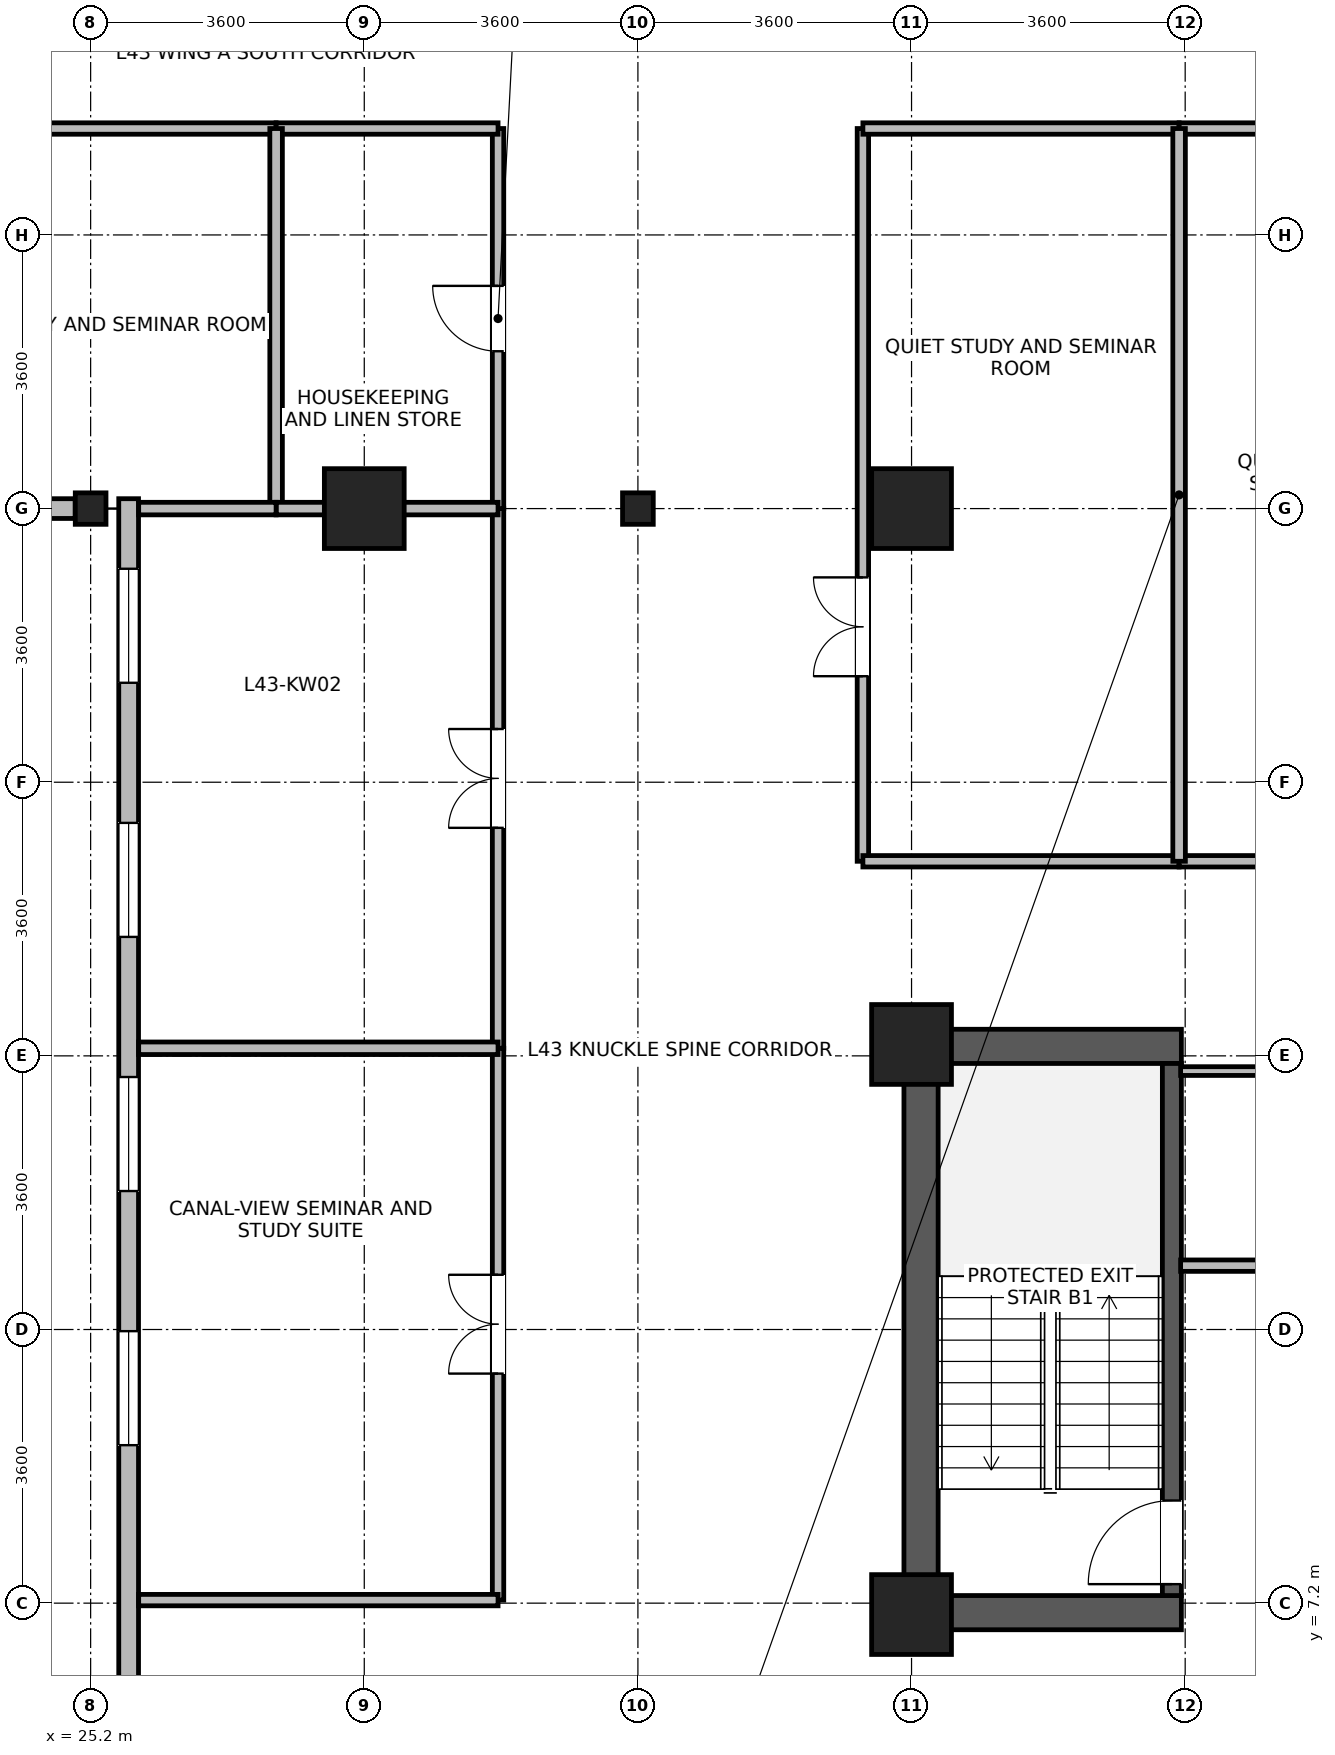
"""IFC4 building model, lengths in metres.
Left out: names, types, materials, properties, quantities, classifications, styles, units other than length and angle.
Written with IfcOpenShell. Run it as: python <this file> out.ifc"""

import sys

from ifc_helpers import new_model, si_unit, direction, frame, frame_2d, origin, origin_2d, place, context, subcontext, project, spatial, rectangle, i_section, extrude, source, transform, mapped, element, fill, save


model = new_model("IFC4")
c1 = context("Model", 3, precision=1e-05, world=origin(), true_north=direction((0.0, 1.0)))
c2 = subcontext(c1, "Body", "Model", "MODEL_VIEW")
j1 = project(units=[si_unit("LENGTHUNIT", "METRE"), si_unit("PLANEANGLEUNIT", "RADIAN")], contexts=[c1])
p1 = place(None, origin())
s1 = spatial("IfcSite", under=j1, at=p1, CompositionType="ELEMENT")
p2 = place(p1, origin())
s2 = spatial("IfcBuilding", under=s1, at=p2, CompositionType="ELEMENT")
p3 = place(p2, frame((0.0, 0.0, 169.8)))
s3 = spatial("IfcBuildingStorey", under=s2, at=p3, CompositionType="ELEMENT", Elevation=169.8)
p4 = place(p3, frame((36.125, 6.85, 0.0), z_axis=(0.0, 0.0, 1.0), x_axis=(0.0, 1.0, 0.0)))
e1 = element("IfcWall", 1, at=p4, inside=s3, PredefinedType="SHEAR", context=c2, shape_type="SweptSolid", body=[
    extrude(rectangle(XDim=7.9, YDim=0.45, at=frame_2d((3.95, 0.0))), origin(), (0.0, 0.0, 1.0), 3.46),
])
for number, where, z_axis, x_axis in (
    (2, (36.35, 7.075, 0.0), (0.0, 0.0, 1.0), (1.0, 0.0, 0.0)),
    (3, (36.35, 14.525, 0.0), (0.0, 0.0, 1.0), (1.0, 0.0, 0.0)),
):
    element("IfcWall", number, at=place(p3, frame(where, z_axis=z_axis, x_axis=x_axis)), inside=s3, PredefinedType="SHEAR", context=c2, shape_type="SweptSolid", body=[
        extrude(rectangle(XDim=3.2, YDim=0.45, at=frame_2d((1.6, 0.0))), origin(), (0.0, 0.0, 1.0), 3.46),
    ])
p5 = place(p3, frame((39.425, 7.3, 0.0), z_axis=(0.0, 0.0, 1.0), x_axis=(0.0, 1.0, 0.0)))
e4 = element("IfcWall", 4, at=p5, inside=s3, PredefinedType="SHEAR", context=c2, shape_type="SweptSolid", body=[
    extrude(rectangle(XDim=7.0, YDim=0.25, at=frame_2d((3.5, 0.0))), origin(), (0.0, 0.0, 1.0), 3.46),
])
p6 = place(p5, frame((0.15, 0.0, 0.0)))
e5 = element("IfcOpeningElement", 5, at=p6, cuts=e4, PredefinedType="OPENING", context=c2, shape_type="SweptSolid", body=[
    extrude(rectangle(XDim=1.1, YDim=2.08, at=frame_2d((0.55, 1.04))), frame((0.0, 0.135, 0.0), z_axis=(0.0, -1.0, 0.0), x_axis=(1.0, 0.0, 0.0)), (0.0, 0.0, 1.0), 0.27),
])
m1 = source(origin(), c2, "Body", "SweptSolid", [
    extrude(rectangle(XDim=1.05, YDim=1.05, at=origin_2d()), origin(), (0.0, 0.0, 1.0), 3.7),
])
for number, where, z_axis, x_axis in (
    (6, (28.8, 21.6, 0.0), (0.0, 0.0, 1.0), (1.0, 0.0, 0.0)),
    (7, (36.0, 21.6, 0.0), (0.0, 0.0, 1.0), (1.0, 0.0, 0.0)),
    (8, (36.0, 7.05, 0.0), (0.0, 0.0, 1.0), (1.0, 0.0, 0.0)),
    (9, (36.0, 14.55, 0.0), (0.0, 0.0, 1.0), (1.0, 0.0, 0.0)),
):
    element("IfcColumn", number, at=place(p3, frame(where, z_axis=z_axis, x_axis=x_axis)), inside=s3, PredefinedType="COLUMN", context=c2, shape_type="MappedRepresentation", body=[
        mapped(m1, transform((0.0, 0.0, 0.0), x_axis=(1.0, 0.0, 0.0), y_axis=(0.0, 1.0, 0.0), z_axis=(0.0, 0.0, 1.0), scale=1.0)),
    ])
m2 = source(origin(), c2, "Body", "SweptSolid", [
    extrude(i_section(OverallWidth=0.404, OverallDepth=0.414, WebThickness=0.021, FlangeThickness=0.028, FilletRadius=0.015, at=origin_2d()), origin(), (0.0, 0.0, 1.0), 3.7),
])
for number, where, z_axis, x_axis in (
    (10, (25.2, 21.6, 0.0), (0.0, 0.0, 1.0), (1.0, 0.0, 0.0)),
    (11, (32.4, 21.6, 0.0), (0.0, 0.0, 1.0), (1.0, 0.0, 0.0)),
):
    element("IfcColumn", number, at=place(p3, frame(where, z_axis=z_axis, x_axis=x_axis)), inside=s3, PredefinedType="COLUMN", context=c2, shape_type="MappedRepresentation", body=[
        mapped(m2, transform((0.0, 0.0, 0.0), x_axis=(1.0, 0.0, 0.0), y_axis=(0.0, 1.0, 0.0), z_axis=(0.0, 0.0, 1.0), scale=1.0)),
    ])
p7 = place(p3, frame((24.997, 21.6, 0.0), z_axis=(0.0, 0.0, 1.0), x_axis=(-1.0, 0.0, 0.0)))
e12 = element("IfcWall", 12, at=p7, inside=s3, PredefinedType="STANDARD", context=c2, shape_type="SweptSolid", body=[
    extrude(rectangle(XDim=2.871, YDim=0.26, at=frame_2d((1.436, 0.0))), origin(), (0.0, 0.0, 1.0), 2.99),
])
p8 = place(p7, frame((0.96, 0.0, 0.85)))
e13 = element("IfcOpeningElement", 13, at=p8, cuts=e12, PredefinedType="OPENING", context=c2, shape_type="SweptSolid", body=[
    extrude(rectangle(XDim=0.95, YDim=1.75, at=frame_2d((0.475, 0.875))), frame((0.0, 0.14, 0.0), z_axis=(0.0, -1.0, 0.0), x_axis=(1.0, 0.0, 0.0)), (0.0, 0.0, 1.0), 0.28),
])
p9 = place(p3, frame((25.7, 1.67, 0.0), z_axis=(0.0, 0.0, 1.0), x_axis=(0.0, 1.0, 0.0)))
e14 = element("IfcWall", 14, at=p9, inside=s3, PredefinedType="STANDARD", context=c2, shape_type="SweptSolid", body=[
    extrude(rectangle(XDim=20.06, YDim=0.26, at=frame_2d((10.03, 0.0))), origin(), (0.0, 0.0, 1.0), 3.44),
])
p10 = place(p9, frame((0.922, 0.0, 0.85)))
e15 = element("IfcOpeningElement", 15, at=p10, cuts=e14, PredefinedType="OPENING", context=c2, shape_type="SweptSolid", body=[
    extrude(rectangle(XDim=1.5, YDim=1.85, at=frame_2d((0.75, 0.925))), frame((0.0, 0.14, 0.0), z_axis=(0.0, -1.0, 0.0), x_axis=(1.0, 0.0, 0.0)), (0.0, 0.0, 1.0), 0.28),
])
p11 = place(p9, frame((7.608, 0.0, 0.85)))
e16 = element("IfcOpeningElement", 16, at=p11, cuts=e14, PredefinedType="OPENING", context=c2, shape_type="SweptSolid", body=[
    extrude(rectangle(XDim=1.5, YDim=1.85, at=frame_2d((0.75, 0.925))), frame((0.0, 0.14, 0.0), z_axis=(0.0, -1.0, 0.0), x_axis=(1.0, 0.0, 0.0)), (0.0, 0.0, 1.0), 0.28),
])
p12 = place(p9, frame((10.952, 0.0, 0.85)))
e17 = element("IfcOpeningElement", 17, at=p12, cuts=e14, PredefinedType="OPENING", context=c2, shape_type="SweptSolid", body=[
    extrude(rectangle(XDim=1.5, YDim=1.85, at=frame_2d((0.75, 0.925))), frame((0.0, 0.14, 0.0), z_axis=(0.0, -1.0, 0.0), x_axis=(1.0, 0.0, 0.0)), (0.0, 0.0, 1.0), 0.28),
])
p13 = place(p9, frame((14.295, 0.0, 0.85)))
e18 = element("IfcOpeningElement", 18, at=p13, cuts=e14, PredefinedType="OPENING", context=c2, shape_type="SweptSolid", body=[
    extrude(rectangle(XDim=1.5, YDim=1.85, at=frame_2d((0.75, 0.925))), frame((0.0, 0.14, 0.0), z_axis=(0.0, -1.0, 0.0), x_axis=(1.0, 0.0, 0.0)), (0.0, 0.0, 1.0), 0.28),
])
p14 = place(p9, frame((17.638, 0.0, 0.85)))
e19 = element("IfcOpeningElement", 19, at=p14, cuts=e14, PredefinedType="OPENING", context=c2, shape_type="SweptSolid", body=[
    extrude(rectangle(XDim=1.5, YDim=1.85, at=frame_2d((0.75, 0.925))), frame((0.0, 0.14, 0.0), z_axis=(0.0, -1.0, 0.0), x_axis=(1.0, 0.0, 0.0)), (0.0, 0.0, 1.0), 0.28),
])
p15 = place(p3, frame((35.36, 16.96, 0.0), z_axis=(0.0, 0.0, 1.0), x_axis=(0.0, 1.0, 0.0)))
e20 = element("IfcWall", 20, at=p15, inside=s3, PredefinedType="PARTITIONING", context=c2, shape_type="SweptSolid", body=[
    extrude(rectangle(XDim=9.64, YDim=0.15, at=frame_2d((4.82, 0.0))), origin(), (0.0, 0.0, 1.0), 3.44),
])
p16 = place(p15, frame((2.435, 0.0, 0.0)))
e21 = element("IfcOpeningElement", 21, at=p16, cuts=e20, PredefinedType="OPENING", context=c2, shape_type="SweptSolid", body=[
    extrude(rectangle(XDim=1.3, YDim=2.12, at=frame_2d((0.65, 1.06))), frame((0.0, 0.085, 0.0), z_axis=(0.0, -1.0, 0.0), x_axis=(1.0, 0.0, 0.0)), (0.0, 0.0, 1.0), 0.17),
])
p17 = place(p3, frame((19.4, 26.6, 0.0), z_axis=(0.0, 0.0, 1.0), x_axis=(1.0, 0.0, 0.0)))
e22 = element("IfcWall", 22, at=p17, inside=s3, PredefinedType="PARTITIONING", context=c2, shape_type="SweptSolid", body=[
    extrude(rectangle(XDim=8.24, YDim=0.15, at=frame_2d((4.12, 0.0))), origin(), (0.0, 0.0, 1.0), 3.44),
])
p18 = place(p17, frame((3.47, 0.0, 0.0)))
e23 = element("IfcOpeningElement", 23, at=p18, cuts=e22, PredefinedType="OPENING", context=c2, shape_type="SweptSolid", body=[
    extrude(rectangle(XDim=1.3, YDim=2.12, at=frame_2d((0.65, 1.06))), frame((0.0, 0.085, 0.0), z_axis=(0.0, -1.0, 0.0), x_axis=(1.0, 0.0, 0.0)), (0.0, 0.0, 1.0), 0.17),
])
p19 = place(p3, frame((30.56, 7.24, 0.0), z_axis=(0.0, 0.0, 1.0), x_axis=(0.0, 1.0, 0.0)))
e24 = element("IfcWall", 24, at=p19, inside=s3, PredefinedType="PARTITIONING", context=c2, shape_type="SweptSolid", body=[
    extrude(rectangle(XDim=7.26, YDim=0.15, at=frame_2d((3.63, 0.0))), origin(), (0.0, 0.0, 1.0), 3.44),
])
p20 = place(p19, frame((2.98, 0.0, 0.0)))
e25 = element("IfcOpeningElement", 25, at=p20, cuts=e24, PredefinedType="OPENING", context=c2, shape_type="SweptSolid", body=[
    extrude(rectangle(XDim=1.3, YDim=2.12, at=frame_2d((0.65, 1.06))), frame((0.0, 0.085, 0.0), z_axis=(0.0, -1.0, 0.0), x_axis=(1.0, 0.0, 0.0)), (0.0, 0.0, 1.0), 0.17),
])
p21 = place(p3, frame((30.56, 14.5, 0.0), z_axis=(0.0, 0.0, 1.0), x_axis=(0.0, 1.0, 0.0)))
e26 = element("IfcWall", 26, at=p21, inside=s3, PredefinedType="PARTITIONING", context=c2, shape_type="SweptSolid", body=[
    extrude(rectangle(XDim=7.1, YDim=0.15, at=frame_2d((3.55, 0.0))), origin(), (0.0, 0.0, 1.0), 3.44),
])
p22 = place(p21, frame((2.9, 0.0, 0.0)))
e27 = element("IfcOpeningElement", 27, at=p22, cuts=e26, PredefinedType="OPENING", context=c2, shape_type="SweptSolid", body=[
    extrude(rectangle(XDim=1.3, YDim=2.12, at=frame_2d((0.65, 1.06))), frame((0.0, 0.085, 0.0), z_axis=(0.0, -1.0, 0.0), x_axis=(1.0, 0.0, 0.0)), (0.0, 0.0, 1.0), 0.17),
])
p23 = place(p3, frame((30.56, 21.6, 0.0), z_axis=(0.0, 0.0, 1.0), x_axis=(0.0, 1.0, 0.0)))
e28 = element("IfcWall", 28, at=p23, inside=s3, PredefinedType="PARTITIONING", context=c2, shape_type="SweptSolid", body=[
    extrude(rectangle(XDim=5.0, YDim=0.15, at=frame_2d((2.5, 0.0))), origin(), (0.0, 0.0, 1.0), 3.44),
])
p24 = place(p23, frame((2.07, 0.0, 0.0)))
e29 = element("IfcOpeningElement", 29, at=p24, cuts=e28, PredefinedType="OPENING", context=c2, shape_type="SweptSolid", body=[
    extrude(rectangle(XDim=0.86, YDim=2.02, at=frame_2d((0.43, 1.01))), frame((0.0, 0.085, 0.0), z_axis=(0.0, -1.0, 0.0), x_axis=(1.0, 0.0, 0.0)), (0.0, 0.0, 1.0), 0.17),
])
p25 = place(p3, frame((25.832, 7.24, 0.0), z_axis=(0.0, 0.0, 1.0), x_axis=(1.0, 0.0, 0.0)))
e30 = element("IfcWall", 30, at=p25, inside=s3, PredefinedType="PARTITIONING", context=c2, shape_type="SweptSolid", body=[
    extrude(rectangle(XDim=4.728, YDim=0.15, at=frame_2d((2.364, 0.0))), origin(), (0.0, 0.0, 1.0), 3.44),
])
for number, where, z_axis, x_axis in (
    (31, (35.36, 16.96, 0.0), (0.0, 0.0, 1.0), (1.0, 0.0, 0.0)),
    (32, (35.36, 26.6, 0.0), (0.0, 0.0, 1.0), (1.0, 0.0, 0.0)),
):
    element("IfcWall", number, at=place(p3, frame(where, z_axis=z_axis, x_axis=x_axis)), inside=s3, PredefinedType="PARTITIONING", context=c2, shape_type="SweptSolid", body=[
        extrude(rectangle(XDim=4.16, YDim=0.15, at=frame_2d((2.08, 0.0))), origin(), (0.0, 0.0, 1.0), 3.44),
    ])
p26 = place(p3, frame((39.54, 11.64, 0.0), z_axis=(0.0, 0.0, 1.0), x_axis=(1.0, 0.0, 0.0)))
e33 = element("IfcWall", 33, at=p26, inside=s3, PredefinedType="PARTITIONING", context=c2, shape_type="SweptSolid", body=[
    extrude(rectangle(XDim=4.06, YDim=0.15, at=frame_2d((2.03, 0.0))), origin(), (0.0, 0.0, 1.0), 3.44),
])
p27 = place(p26, frame((1.58, 0.0, 0.0)))
e34 = element("IfcOpeningElement", 34, at=p27, cuts=e33, PredefinedType="OPENING", context=c2, shape_type="SweptSolid", body=[
    extrude(rectangle(XDim=0.9, YDim=2.08, at=frame_2d((0.45, 1.04))), frame((0.0, 0.085, 0.0), z_axis=(0.0, -1.0, 0.0), x_axis=(1.0, 0.0, 0.0)), (0.0, 0.0, 1.0), 0.17),
])
p28 = place(p3, frame((39.52, 16.96, 0.0), z_axis=(0.0, 0.0, 1.0), x_axis=(1.0, 0.0, 0.0)))
e35 = element("IfcWall", 35, at=p28, inside=s3, PredefinedType="PARTITIONING", context=c2, shape_type="SweptSolid", body=[
    extrude(rectangle(XDim=3.86, YDim=0.15, at=frame_2d((1.93, 0.0))), origin(), (0.0, 0.0, 1.0), 3.44),
])
p29 = place(p28, frame((1.28, 0.0, 0.0)))
e36 = element("IfcOpeningElement", 36, at=p29, cuts=e35, PredefinedType="OPENING", context=c2, shape_type="SweptSolid", body=[
    extrude(rectangle(XDim=1.3, YDim=2.12, at=frame_2d((0.65, 1.06))), frame((0.0, 0.085, 0.0), z_axis=(0.0, -1.0, 0.0), x_axis=(1.0, 0.0, 0.0)), (0.0, 0.0, 1.0), 0.17),
])
p30 = place(p3, frame((39.52, 26.6, 0.0), z_axis=(0.0, 0.0, 1.0), x_axis=(1.0, 0.0, 0.0)))
e37 = element("IfcWall", 37, at=p30, inside=s3, PredefinedType="PARTITIONING", context=c2, shape_type="SweptSolid", body=[
    extrude(rectangle(XDim=3.86, YDim=0.15, at=frame_2d((1.93, 0.0))), origin(), (0.0, 0.0, 1.0), 3.44),
])
p31 = place(p3, frame((27.64, 26.6, 0.0), z_axis=(0.0, 0.0, 1.0), x_axis=(1.0, 0.0, 0.0)))
e38 = element("IfcWall", 38, at=p31, inside=s3, PredefinedType="PARTITIONING", context=c2, shape_type="SweptSolid", body=[
    extrude(rectangle(XDim=2.92, YDim=0.15, at=frame_2d((1.46, 0.0))), origin(), (0.0, 0.0, 1.0), 3.44),
])
p32 = place(p3, frame((39.52, 16.96, 0.0), z_axis=(0.0, 0.0, 1.0), x_axis=(0.0, 1.0, 0.0)))
e39 = element("IfcWall", 39, at=p32, inside=s3, PredefinedType="PARTITIONING", context=c2, shape_type="SweptSolid", body=[
    extrude(rectangle(XDim=9.64, YDim=0.165, at=frame_2d((4.82, 0.0))), origin(), (0.0, 0.0, 1.0), 3.44),
])
p33 = place(p3, frame((27.64, 21.6, 0.0), z_axis=(0.0, 0.0, 1.0), x_axis=(0.0, 1.0, 0.0)))
e40 = element("IfcWall", 40, at=p33, inside=s3, PredefinedType="PARTITIONING", context=c2, shape_type="SweptSolid", body=[
    extrude(rectangle(XDim=5.0, YDim=0.165, at=frame_2d((2.5, 0.0))), origin(), (0.0, 0.0, 1.0), 3.44),
])
p34 = place(p3, frame((25.832, 14.5, 0.0), z_axis=(0.0, 0.0, 1.0), x_axis=(1.0, 0.0, 0.0)))
e41 = element("IfcWall", 41, at=p34, inside=s3, PredefinedType="PARTITIONING", context=c2, shape_type="SweptSolid", body=[
    extrude(rectangle(XDim=4.728, YDim=0.165, at=frame_2d((2.364, 0.0))), origin(), (0.0, 0.0, 1.0), 3.44),
])
p35 = place(p3, frame((39.54, 14.2, 0.0), z_axis=(0.0, 0.0, 1.0), x_axis=(1.0, 0.0, 0.0)))
e42 = element("IfcWall", 42, at=p35, inside=s3, PredefinedType="PARTITIONING", context=c2, shape_type="SweptSolid", body=[
    extrude(rectangle(XDim=3.135, YDim=0.115, at=frame_2d((1.567, 0.0))), origin(), (0.0, 0.0, 1.0), 2.44),
])
p36 = place(p3, frame((27.64, 21.6, 0.0), z_axis=(0.0, 0.0, 1.0), x_axis=(1.0, 0.0, 0.0)))
e43 = element("IfcWall", 43, at=p36, inside=s3, PredefinedType="PARTITIONING", context=c2, shape_type="SweptSolid", body=[
    extrude(rectangle(XDim=2.92, YDim=0.165, at=frame_2d((1.46, 0.0))), origin(), (0.0, 0.0, 1.0), 2.99),
])
p37 = place(p3, frame((25.832, 21.6, 0.0), z_axis=(0.0, 0.0, 1.0), x_axis=(1.0, 0.0, 0.0)))
e44 = element("IfcWall", 44, at=p37, inside=s3, PredefinedType="PARTITIONING", context=c2, shape_type="SweptSolid", body=[
    extrude(rectangle(XDim=1.808, YDim=0.165, at=frame_2d((0.904, 0.0))), origin(), (0.0, 0.0, 1.0), 2.99),
])
p38 = place(p11, origin())
e45 = element("IfcWindow", 45, at=p38, inside=s3, PartitioningType="SINGLE_PANEL", PredefinedType="WINDOW", context=c2, shape_type="SweptSolid", body=[
    extrude(rectangle(XDim=1.5, YDim=1.85, at=frame_2d((0.75, 0.925))), frame((0.0, 0.03, 0.0), z_axis=(0.0, -1.0, 0.0), x_axis=(1.0, 0.0, 0.0)), (0.0, 0.0, 1.0), 0.06),
])
fill(e16, e45)
p39 = place(p12, origin())
e46 = element("IfcWindow", 46, at=p39, inside=s3, PartitioningType="SINGLE_PANEL", PredefinedType="WINDOW", context=c2, shape_type="SweptSolid", body=[
    extrude(rectangle(XDim=1.5, YDim=1.85, at=frame_2d((0.75, 0.925))), frame((0.0, 0.03, 0.0), z_axis=(0.0, -1.0, 0.0), x_axis=(1.0, 0.0, 0.0)), (0.0, 0.0, 1.0), 0.06),
])
fill(e17, e46)
p40 = place(p13, origin())
e47 = element("IfcWindow", 47, at=p40, inside=s3, PartitioningType="SINGLE_PANEL", PredefinedType="WINDOW", context=c2, shape_type="SweptSolid", body=[
    extrude(rectangle(XDim=1.5, YDim=1.85, at=frame_2d((0.75, 0.925))), frame((0.0, 0.03, 0.0), z_axis=(0.0, -1.0, 0.0), x_axis=(1.0, 0.0, 0.0)), (0.0, 0.0, 1.0), 0.06),
])
fill(e18, e47)
p41 = place(p14, origin())
e48 = element("IfcWindow", 48, at=p41, inside=s3, PartitioningType="SINGLE_PANEL", PredefinedType="WINDOW", context=c2, shape_type="SweptSolid", body=[
    extrude(rectangle(XDim=1.5, YDim=1.85, at=frame_2d((0.75, 0.925))), frame((0.0, 0.03, 0.0), z_axis=(0.0, -1.0, 0.0), x_axis=(1.0, 0.0, 0.0)), (0.0, 0.0, 1.0), 0.06),
])
fill(e19, e48)
p42 = place(p6, origin())
e49 = element("IfcDoor", 49, at=p42, inside=s3, OperationType="SINGLE_SWING_LEFT", PredefinedType="DOOR", context=c2, shape_type="SweptSolid", body=[
    extrude(rectangle(XDim=1.1, YDim=2.08, at=frame_2d((0.55, 1.04))), frame((0.0, 0.025, 0.0), z_axis=(0.0, -1.0, 0.0), x_axis=(1.0, 0.0, 0.0)), (0.0, 0.0, 1.0), 0.05),
])
fill(e5, e49)
p43 = place(p16, origin())
e50 = element("IfcDoor", 50, at=p43, inside=s3, OperationType="DOUBLE_DOOR_SINGLE_SWING", PredefinedType="DOOR", context=c2, shape_type="SweptSolid", body=[
    extrude(rectangle(XDim=1.3, YDim=2.12, at=frame_2d((0.65, 1.06))), frame((0.0, 0.025, 0.0), z_axis=(0.0, -1.0, 0.0), x_axis=(1.0, 0.0, 0.0)), (0.0, 0.0, 1.0), 0.05),
])
fill(e21, e50)
p44 = place(p20, origin())
e51 = element("IfcDoor", 51, at=p44, inside=s3, OperationType="DOUBLE_DOOR_SINGLE_SWING", PredefinedType="DOOR", context=c2, shape_type="SweptSolid", body=[
    extrude(rectangle(XDim=1.3, YDim=2.12, at=frame_2d((0.65, 1.06))), frame((0.0, 0.025, 0.0), z_axis=(0.0, -1.0, 0.0), x_axis=(1.0, 0.0, 0.0)), (0.0, 0.0, 1.0), 0.05),
])
fill(e25, e51)
p45 = place(p22, origin())
e52 = element("IfcDoor", 52, at=p45, inside=s3, OperationType="DOUBLE_DOOR_SINGLE_SWING", PredefinedType="DOOR", context=c2, shape_type="SweptSolid", body=[
    extrude(rectangle(XDim=1.3, YDim=2.12, at=frame_2d((0.65, 1.06))), frame((0.0, 0.025, 0.0), z_axis=(0.0, -1.0, 0.0), x_axis=(1.0, 0.0, 0.0)), (0.0, 0.0, 1.0), 0.05),
])
fill(e27, e52)
p46 = place(p24, origin())
e53 = element("IfcDoor", 53, at=p46, inside=s3, OperationType="SINGLE_SWING_RIGHT", PredefinedType="DOOR", context=c2, shape_type="SweptSolid", body=[
    extrude(rectangle(XDim=0.86, YDim=2.02, at=frame_2d((0.43, 1.01))), frame((0.0, 0.025, 0.0), z_axis=(0.0, -1.0, 0.0), x_axis=(1.0, 0.0, 0.0)), (0.0, 0.0, 1.0), 0.05),
])
fill(e29, e53)
save(model, sys.argv[1])
